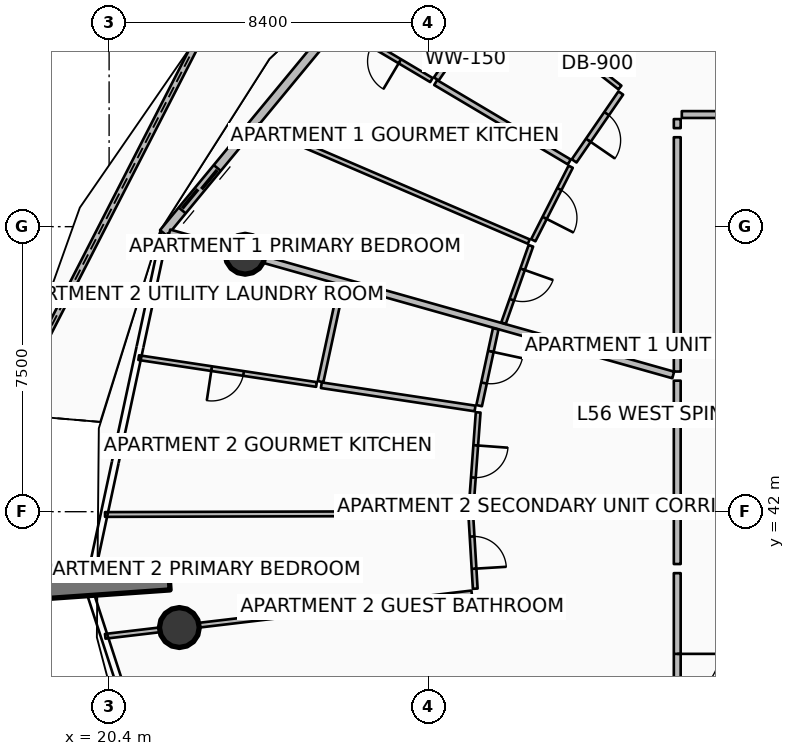
"""IFC4 building model, lengths in metres.
Left out: names, types, materials, properties, quantities, classifications, styles, units other than length and angle.
Written with IfcOpenShell. Run it as: python <this file> out.ifc"""

import sys

from ifc_helpers import new_model, si_unit, direction, frame, frame_2d, origin, origin_2d, place, context, subcontext, project, spatial, polyline, rectangle, circle, outline, extrude, element, fill, save


model = new_model("IFC4")
c1 = context("Model", 3, precision=1e-05, world=origin(), true_north=direction((0.0, 1.0)))
c2 = subcontext(c1, "Body", "Model", "MODEL_VIEW")
j1 = project(units=[si_unit("LENGTHUNIT", "METRE"), si_unit("PLANEANGLEUNIT", "RADIAN")], contexts=[c1])
p1 = place(None, origin())
s1 = spatial("IfcSite", under=j1, at=p1, CompositionType="ELEMENT")
p2 = place(p1, origin())
s2 = spatial("IfcBuilding", under=s1, at=p2, CompositionType="ELEMENT")
p3 = place(p2, frame((0.0, 0.0, 221.55)))
s3 = spatial("IfcBuildingStorey", under=s2, at=p3, CompositionType="ELEMENT", Elevation=221.55)
p4 = place(p3, frame((21.987, 40.181, 0.0), z_axis=(0.0, 0.0, 1.0), x_axis=(-0.997568676264, -0.069690287244, 0.0)))
e1 = element("IfcWall", 1, at=p4, inside=s3, PredefinedType="SOLIDWALL", context=c2, shape_type="SweptSolid", body=[
    extrude(rectangle(XDim=3.5, YDim=0.48, at=frame_2d((1.75, 0.0))), origin(), (0.0, 0.0, 1.0), 3.75),
])
p5 = place(p3, frame((23.98, 48.774, 0.0), z_axis=(-0.277251706749, 0.078156009679, 0.957613246178), x_axis=(-0.271321276561, -0.962488838837, 0.0)))
e2 = element("IfcColumn", 2, at=p5, inside=s3, PredefinedType="COLUMN", context=c2, shape_type="SweptSolid", body=[
    extrude(circle(Radius=0.525, at=origin_2d()), origin(), (0.0, 0.0, 1.0), 3.624),
])
p6 = place(p3, frame((22.248, 38.952, 0.0), z_axis=(-0.296221268103, -0.035054976638, 0.954475829414), x_axis=(0.117520467118, -0.993070460646, 0.0)))
e3 = element("IfcColumn", 3, at=p6, inside=s3, PredefinedType="COLUMN", context=c2, shape_type="SweptSolid", body=[
    extrude(circle(Radius=0.525, at=origin_2d()), origin(), (0.0, 0.0, 1.0), 3.635),
])
p7 = place(p3, frame((22.871, 54.669, 0.0), z_axis=(0.0, 0.0, 1.0), x_axis=(-0.456201330326, -0.889876590437, 0.0)))
e4 = element("IfcWall", 4, at=p7, inside=s3, PredefinedType="PARAPET", context=c2, shape_type="SweptSolid", body=[
    extrude(outline(polyline([(0.0, 0.0), (11.347, 0.0), (11.347, 1.747), (5.674, 1.562), (0.0, 1.348), (0.0, 0.0)])), frame((0.0, 0.09, 0.0), z_axis=(0.0, -1.0, 0.0), x_axis=(1.0, 0.0, 0.0)), (0.0, 0.0, 1.0), 0.18),
])
p8 = place(p3, frame((28.515, 57.424, 0.0), z_axis=(0.0, 0.0, 1.0), x_axis=(-0.636759394418, -0.771062561418, 0.0)))
e5 = element("IfcWall", 5, at=p8, inside=s3, PredefinedType="SOLIDWALL", context=c2, shape_type="SweptSolid", body=[
    extrude(rectangle(XDim=10.494, YDim=0.24, at=frame_2d((5.247, 0.0))), origin(), (0.0, 0.0, 1.0), 2.42),
])
p9 = place(p8, frame((8.274, 0.0, 0.0)))
e6 = element("IfcOpeningElement", 6, at=p9, cuts=e5, PredefinedType="OPENING", context=c2, shape_type="SweptSolid", body=[
    extrude(rectangle(XDim=1.45, YDim=2.15, at=frame_2d((0.725, 1.075))), frame((0.0, 0.13, 0.0), z_axis=(0.0, -1.0, 0.0), x_axis=(1.0, 0.0, 0.0)), (0.0, 0.0, 1.0), 0.26),
])
p10 = place(p8, frame((0.28, 0.0, 0.65)))
e7 = element("IfcOpeningElement", 7, at=p10, cuts=e5, PredefinedType="OPENING", context=c2, shape_type="SweptSolid", body=[
    extrude(rectangle(XDim=1.6, YDim=1.5, at=frame_2d((0.8, 0.75))), frame((0.0, 0.13, 0.0), z_axis=(0.0, -1.0, 0.0), x_axis=(1.0, 0.0, 0.0)), (0.0, 0.0, 1.0), 0.26),
])
p11 = place(p3, frame((35.244, 45.598, 0.0), z_axis=(0.0, 0.0, 1.0), x_axis=(-0.962456561262, 0.271435752405, 0.0)))
e8 = element("IfcWall", 8, at=p11, inside=s3, PredefinedType="PARTITIONING", context=c2, shape_type="SweptSolid", body=[
    extrude(rectangle(XDim=13.777, YDim=0.18, at=frame_2d((6.888, 0.0))), origin(), (0.0, 0.0, 1.0), 2.427),
])
p12 = place(p3, frame((42.028, 52.45, 0.0), z_axis=(0.0, 0.0, 1.0), x_axis=(-1.0, 0.0, 0.0)))
e9 = element("IfcWall", 9, at=p12, inside=s3, PredefinedType="PARTITIONING", context=c2, shape_type="SweptSolid", body=[
    extrude(rectangle(XDim=6.558, YDim=0.18, at=frame_2d((3.279, 0.0))), origin(), (0.0, 0.0, 1.0), 2.427),
])
p13 = place(p12, frame((2.729, 0.0, 0.0)))
e10 = element("IfcOpeningElement", 10, at=p13, cuts=e9, PredefinedType="OPENING", context=c2, shape_type="SweptSolid", body=[
    extrude(rectangle(XDim=1.1, YDim=2.1, at=frame_2d((0.55, 1.05))), frame((0.0, 0.1, 0.0), z_axis=(0.0, -1.0, 0.0), x_axis=(1.0, 0.0, 0.0)), (0.0, 0.0, 1.0), 0.2),
])
p14 = place(p3, frame((35.35, 52.33, 0.0), z_axis=(0.0, 0.0, 1.0), x_axis=(0.0, -1.0, 0.0)))
e11 = element("IfcWall", 11, at=p14, inside=s3, PredefinedType="PARTITIONING", context=c2, shape_type="SweptSolid", body=[
    extrude(rectangle(XDim=0.238, YDim=0.18, at=frame_2d((0.119, 0.0))), origin(), (0.0, 0.0, 1.0), 2.427),
])
p15 = place(p3, frame((35.35, 51.853, 0.0), z_axis=(0.0, 0.0, 1.0), x_axis=(0.0, -1.0, 0.0)))
e12 = element("IfcWall", 12, at=p15, inside=s3, PredefinedType="PARTITIONING", context=c2, shape_type="SweptSolid", body=[
    extrude(rectangle(XDim=6.165, YDim=0.18, at=frame_2d((3.083, 0.0))), origin(), (0.0, 0.0, 1.0), 2.427),
])
p16 = place(p3, frame((33.842, 53.161, 0.0), z_axis=(0.0, 0.0, 1.0), x_axis=(-0.785311801239, 0.619100456173, 0.0)))
e13 = element("IfcWall", 13, at=p16, inside=s3, PredefinedType="PARTITIONING", context=c2, shape_type="SweptSolid", body=[
    extrude(rectangle(XDim=6.799, YDim=0.125, at=frame_2d((3.4, 0.0))), origin(), (0.0, 0.0, 1.0), 2.427),
])
p17 = place(p3, frame((33.864, 53.017, 0.0), z_axis=(0.0, 0.0, 1.0), x_axis=(-0.56614137875, -0.824308157953, 0.0)))
e14 = element("IfcWall", 14, at=p17, inside=s3, PredefinedType="PARTITIONING", context=c2, shape_type="SweptSolid", body=[
    extrude(rectangle(XDim=2.167, YDim=0.15, at=frame_2d((1.083, 0.0))), origin(), (0.0, 0.0, 1.0), 2.427),
])
p18 = place(p17, frame((0.658, 0.0, 0.0)))
e15 = element("IfcOpeningElement", 15, at=p18, cuts=e14, PredefinedType="OPENING", context=c2, shape_type="SweptSolid", body=[
    extrude(rectangle(XDim=0.85, YDim=2.06, at=frame_2d((0.425, 1.03))), frame((0.0, 0.085, 0.0), z_axis=(0.0, -1.0, 0.0), x_axis=(1.0, 0.0, 0.0)), (0.0, 0.0, 1.0), 0.17),
])
p19 = place(p3, frame((30.55, 55.629, 0.0), z_axis=(0.0, 0.0, 1.0), x_axis=(-0.566136620745, -0.824311425768, 0.0)))
e16 = element("IfcWall", 16, at=p19, inside=s3, PredefinedType="PARTITIONING", context=c2, shape_type="SweptSolid", body=[
    extrude(rectangle(XDim=2.721, YDim=0.15, at=frame_2d((1.361, 0.0))), origin(), (0.0, 0.0, 1.0), 2.427),
])
p20 = place(p3, frame((32.509, 51.202, 0.0), z_axis=(0.0, 0.0, 1.0), x_axis=(-0.859744174922, 0.510724929573, 0.0)))
e17 = element("IfcWall", 17, at=p20, inside=s3, PredefinedType="PARTITIONING", context=c2, shape_type="SweptSolid", body=[
    extrude(rectangle(XDim=4.09, YDim=0.15, at=frame_2d((2.045, 0.0))), origin(), (0.0, 0.0, 1.0), 2.91),
])
p21 = place(p3, frame((28.881, 53.358, 0.0), z_axis=(0.0, 0.0, 1.0), x_axis=(-0.859746342612, 0.51072128051, 0.0)))
e18 = element("IfcWall", 18, at=p21, inside=s3, PredefinedType="PARTITIONING", context=c2, shape_type="SweptSolid", body=[
    extrude(rectangle(XDim=2.781, YDim=0.125, at=frame_2d((1.391, 0.0))), origin(), (0.0, 0.0, 1.0), 2.445),
])
p22 = place(p21, frame((0.966, 0.0, 0.0)))
e19 = element("IfcOpeningElement", 19, at=p22, cuts=e18, PredefinedType="OPENING", context=c2, shape_type="SweptSolid", body=[
    extrude(rectangle(XDim=0.85, YDim=2.06, at=frame_2d((0.425, 1.03))), frame((0.0, 0.073, 0.0), z_axis=(0.0, -1.0, 0.0), x_axis=(1.0, 0.0, 0.0)), (0.0, 0.0, 1.0), 0.145),
])
p23 = place(p3, frame((31.443, 49.107, 0.0), z_axis=(0.0, 0.0, 1.0), x_axis=(-0.918923160155, 0.394436592789, 0.0)))
e20 = element("IfcWall", 20, at=p23, inside=s3, PredefinedType="PARTITIONING", context=c2, shape_type="SweptSolid", body=[
    extrude(rectangle(XDim=7.746, YDim=0.125, at=frame_2d((3.873, 0.0))), origin(), (0.0, 0.0, 1.0), 2.445),
])
p24 = place(p3, frame((32.546, 51.076, 0.0), z_axis=(0.0, 0.0, 1.0), x_axis=(-0.453549779993, -0.891230944855, 0.0)))
e21 = element("IfcWall", 21, at=p24, inside=s3, PredefinedType="PARTITIONING", context=c2, shape_type="SweptSolid", body=[
    extrude(rectangle(XDim=2.169, YDim=0.125, at=frame_2d((1.084, 0.0))), origin(), (0.0, 0.0, 1.0), 2.91),
])
p25 = place(p24, frame((0.66, 0.0, 0.0)))
e22 = element("IfcOpeningElement", 22, at=p25, cuts=e21, PredefinedType="OPENING", context=c2, shape_type="SweptSolid", body=[
    extrude(rectangle(XDim=0.85, YDim=2.06, at=frame_2d((0.425, 1.03))), frame((0.0, 0.073, 0.0), z_axis=(0.0, -1.0, 0.0), x_axis=(1.0, 0.0, 0.0)), (0.0, 0.0, 1.0), 0.145),
])
p26 = place(p3, frame((31.499, 48.996, 0.0), z_axis=(0.0, 0.0, 1.0), x_axis=(-0.333577104371, -0.942722820048, 0.0)))
e23 = element("IfcWall", 23, at=p26, inside=s3, PredefinedType="PARTITIONING", context=c2, shape_type="SweptSolid", body=[
    extrude(rectangle(XDim=2.159, YDim=0.125, at=frame_2d((1.08, 0.0))), origin(), (0.0, 0.0, 1.0), 2.427),
])
p27 = place(p26, frame((0.655, 0.0, 0.0)))
e24 = element("IfcOpeningElement", 24, at=p27, cuts=e23, PredefinedType="OPENING", context=c2, shape_type="SweptSolid", body=[
    extrude(rectangle(XDim=0.85, YDim=2.06, at=frame_2d((0.425, 1.03))), frame((0.0, 0.073, 0.0), z_axis=(0.0, -1.0, 0.0), x_axis=(1.0, 0.0, 0.0)), (0.0, 0.0, 1.0), 0.145),
])
p28 = place(p3, frame((35.35, 40.383, 0.0), z_axis=(0.0, 0.0, 1.0), x_axis=(0.0, -1.0, 0.0)))
e25 = element("IfcWall", 25, at=p28, inside=s3, PredefinedType="PARTITIONING", context=c2, shape_type="SweptSolid", body=[
    extrude(rectangle(XDim=5.347, YDim=0.18, at=frame_2d((2.674, 0.0))), origin(), (0.0, 0.0, 1.0), 2.427),
])
p29 = place(p28, frame((2.124, 0.0, 0.0)))
e26 = element("IfcOpeningElement", 26, at=p29, cuts=e25, PredefinedType="OPENING", context=c2, shape_type="SweptSolid", body=[
    extrude(rectangle(XDim=1.1, YDim=2.1, at=frame_2d((0.55, 1.05))), frame((0.0, 0.1, 0.0), z_axis=(0.0, -1.0, 0.0), x_axis=(1.0, 0.0, 0.0)), (0.0, 0.0, 1.0), 0.2),
])
p30 = place(p3, frame((35.35, 45.448, 0.0), z_axis=(0.0, 0.0, 1.0), x_axis=(0.0, -1.0, 0.0)))
e27 = element("IfcWall", 27, at=p30, inside=s3, PredefinedType="PARTITIONING", context=c2, shape_type="SweptSolid", body=[
    extrude(rectangle(XDim=4.825, YDim=0.18, at=frame_2d((2.413, 0.0))), origin(), (0.0, 0.0, 1.0), 2.427),
])
p31 = place(p3, frame((29.941, 39.863, 0.0), z_axis=(0.0, 0.0, 1.0), x_axis=(-0.993068152832, -0.117539966947, 0.0)))
e28 = element("IfcWall", 28, at=p31, inside=s3, PredefinedType="PARTITIONING", context=c2, shape_type="SweptSolid", body=[
    extrude(rectangle(XDim=9.71, YDim=0.125, at=frame_2d((4.855, 0.0))), origin(), (0.0, 0.0, 1.0), 2.427),
])
p32 = place(p3, frame((30.573, 46.811, 0.0), z_axis=(0.0, 0.0, 1.0), x_axis=(-0.210835659219, -0.977521521401, 0.0)))
e29 = element("IfcWall", 29, at=p32, inside=s3, PredefinedType="PARTITIONING", context=c2, shape_type="SweptSolid", body=[
    extrude(rectangle(XDim=2.067, YDim=0.15, at=frame_2d((1.033, 0.0))), origin(), (0.0, 0.0, 1.0), 2.427),
])
p33 = place(p32, frame((0.608, 0.0, 0.0)))
e30 = element("IfcOpeningElement", 30, at=p33, cuts=e29, PredefinedType="OPENING", context=c2, shape_type="SweptSolid", body=[
    extrude(rectangle(XDim=0.85, YDim=2.06, at=frame_2d((0.425, 1.03))), frame((0.0, 0.085, 0.0), z_axis=(0.0, -1.0, 0.0), x_axis=(1.0, 0.0, 0.0)), (0.0, 0.0, 1.0), 0.17),
])
p34 = place(p3, frame((26.511, 47.957, 0.0), z_axis=(0.0, 0.0, 1.0), x_axis=(-0.21075674418, -0.977538538771, 0.0)))
e31 = element("IfcWall", 31, at=p34, inside=s3, PredefinedType="PARTITIONING", context=c2, shape_type="SweptSolid", body=[
    extrude(rectangle(XDim=2.594, YDim=0.15, at=frame_2d((1.297, 0.0))), origin(), (0.0, 0.0, 1.0), 2.427),
])
p35 = place(p3, frame((30.029, 44.716, 0.0), z_axis=(0.0, 0.0, 1.0), x_axis=(-0.988774638917, 0.149414569018, 0.0)))
e32 = element("IfcWall", 32, at=p35, inside=s3, PredefinedType="PARTITIONING", context=c2, shape_type="SweptSolid", body=[
    extrude(rectangle(XDim=4.09, YDim=0.15, at=frame_2d((2.045, 0.0))), origin(), (0.0, 0.0, 1.0), 2.91),
])
p36 = place(p3, frame((25.856, 45.347, 0.0), z_axis=(0.0, 0.0, 1.0), x_axis=(-0.988769177465, 0.149450706573, 0.0)))
e33 = element("IfcWall", 33, at=p36, inside=s3, PredefinedType="PARTITIONING", context=c2, shape_type="SweptSolid", body=[
    extrude(rectangle(XDim=4.731, YDim=0.125, at=frame_2d((2.365, 0.0))), origin(), (0.0, 0.0, 1.0), 2.445),
])
p37 = place(p36, frame((1.94, 0.0, 0.0)))
e34 = element("IfcOpeningElement", 34, at=p37, cuts=e33, PredefinedType="OPENING", context=c2, shape_type="SweptSolid", body=[
    extrude(rectangle(XDim=0.85, YDim=2.06, at=frame_2d((0.425, 1.03))), frame((0.0, 0.073, 0.0), z_axis=(0.0, -1.0, 0.0), x_axis=(1.0, 0.0, 0.0)), (0.0, 0.0, 1.0), 0.145),
])
p38 = place(p3, frame((29.825, 41.952, 0.0), z_axis=(0.0, 0.0, 1.0), x_axis=(-0.999996520366, -0.002638040201, 0.0)))
e35 = element("IfcWall", 35, at=p38, inside=s3, PredefinedType="PARTITIONING", context=c2, shape_type="SweptSolid", body=[
    extrude(rectangle(XDim=9.532, YDim=0.125, at=frame_2d((4.766, 0.0))), origin(), (0.0, 0.0, 1.0), 2.445),
])
p39 = place(p3, frame((30.112, 44.613, 0.0), z_axis=(0.0, 0.0, 1.0), x_axis=(-0.073673624572, -0.997282405862, 0.0)))
e36 = element("IfcWall", 36, at=p39, inside=s3, PredefinedType="PARTITIONING", context=c2, shape_type="SweptSolid", body=[
    extrude(rectangle(XDim=2.588, YDim=0.125, at=frame_2d((1.294, 0.0))), origin(), (0.0, 0.0, 1.0), 2.91),
])
p40 = place(p39, frame((0.869, 0.0, 0.0)))
e37 = element("IfcOpeningElement", 37, at=p40, cuts=e36, PredefinedType="OPENING", context=c2, shape_type="SweptSolid", body=[
    extrude(rectangle(XDim=0.85, YDim=2.06, at=frame_2d((0.425, 1.03))), frame((0.0, 0.073, 0.0), z_axis=(0.0, -1.0, 0.0), x_axis=(1.0, 0.0, 0.0)), (0.0, 0.0, 1.0), 0.145),
])
p41 = place(p3, frame((29.92, 41.872, 0.0), z_axis=(0.0, 0.0, 1.0), x_axis=(0.060212096345, -0.998185605714, 0.0)))
e38 = element("IfcWall", 38, at=p41, inside=s3, PredefinedType="PARTITIONING", context=c2, shape_type="SweptSolid", body=[
    extrude(rectangle(XDim=1.902, YDim=0.125, at=frame_2d((0.951, 0.0))), origin(), (0.0, 0.0, 1.0), 2.427),
])
p42 = place(p41, frame((0.526, 0.0, 0.0)))
e39 = element("IfcOpeningElement", 39, at=p42, cuts=e38, PredefinedType="OPENING", context=c2, shape_type="SweptSolid", body=[
    extrude(rectangle(XDim=0.85, YDim=2.06, at=frame_2d((0.425, 1.03))), frame((0.0, 0.073, 0.0), z_axis=(0.0, -1.0, 0.0), x_axis=(1.0, 0.0, 0.0)), (0.0, 0.0, 1.0), 0.145),
])
p43 = place(p9, origin())
e40 = element("IfcDoor", 40, at=p43, inside=s3, OperationType="DOUBLE_DOOR_SLIDING", PredefinedType="DOOR", context=c2, shape_type="SweptSolid", body=[
    extrude(rectangle(XDim=1.45, YDim=2.15, at=frame_2d((0.725, 1.075))), frame((0.0, 0.025, 0.0), z_axis=(0.0, -1.0, 0.0), x_axis=(1.0, 0.0, 0.0)), (0.0, 0.0, 1.0), 0.05),
])
fill(e6, e40)
p44 = place(p18, origin())
e41 = element("IfcDoor", 41, at=p44, inside=s3, OperationType="SINGLE_SWING_RIGHT", PredefinedType="DOOR", context=c2, shape_type="SweptSolid", body=[
    extrude(rectangle(XDim=0.85, YDim=2.06, at=frame_2d((0.425, 1.03))), frame((0.0, 0.025, 0.0), z_axis=(0.0, -1.0, 0.0), x_axis=(1.0, 0.0, 0.0)), (0.0, 0.0, 1.0), 0.05),
])
fill(e15, e41)
p45 = place(p22, origin())
e42 = element("IfcDoor", 42, at=p45, inside=s3, OperationType="SINGLE_SWING_LEFT", PredefinedType="DOOR", context=c2, shape_type="SweptSolid", body=[
    extrude(rectangle(XDim=0.85, YDim=2.06, at=frame_2d((0.425, 1.03))), frame((0.0, 0.025, 0.0), z_axis=(0.0, -1.0, 0.0), x_axis=(1.0, 0.0, 0.0)), (0.0, 0.0, 1.0), 0.05),
])
fill(e19, e42)
p46 = place(p25, origin())
e43 = element("IfcDoor", 43, at=p46, inside=s3, OperationType="SINGLE_SWING_RIGHT", PredefinedType="DOOR", context=c2, shape_type="SweptSolid", body=[
    extrude(rectangle(XDim=0.85, YDim=2.06, at=frame_2d((0.425, 1.03))), frame((0.0, 0.025, 0.0), z_axis=(0.0, -1.0, 0.0), x_axis=(1.0, 0.0, 0.0)), (0.0, 0.0, 1.0), 0.05),
])
fill(e22, e43)
p47 = place(p27, origin())
e44 = element("IfcDoor", 44, at=p47, inside=s3, OperationType="SINGLE_SWING_LEFT", PredefinedType="DOOR", context=c2, shape_type="SweptSolid", body=[
    extrude(rectangle(XDim=0.85, YDim=2.06, at=frame_2d((0.425, 1.03))), frame((0.0, 0.025, 0.0), z_axis=(0.0, -1.0, 0.0), x_axis=(1.0, 0.0, 0.0)), (0.0, 0.0, 1.0), 0.05),
])
fill(e24, e44)
p48 = place(p29, origin())
e45 = element("IfcDoor", 45, at=p48, inside=s3, OperationType="SINGLE_SWING_LEFT", PredefinedType="DOOR", context=c2, shape_type="SweptSolid", body=[
    extrude(rectangle(XDim=1.1, YDim=2.1, at=frame_2d((0.55, 1.05))), frame((0.0, 0.025, 0.0), z_axis=(0.0, -1.0, 0.0), x_axis=(1.0, 0.0, 0.0)), (0.0, 0.0, 1.0), 0.05),
])
fill(e26, e45)
p49 = place(p33, origin())
e46 = element("IfcDoor", 46, at=p49, inside=s3, OperationType="SINGLE_SWING_LEFT", PredefinedType="DOOR", context=c2, shape_type="SweptSolid", body=[
    extrude(rectangle(XDim=0.85, YDim=2.06, at=frame_2d((0.425, 1.03))), frame((0.0, 0.025, 0.0), z_axis=(0.0, -1.0, 0.0), x_axis=(1.0, 0.0, 0.0)), (0.0, 0.0, 1.0), 0.05),
])
fill(e30, e46)
p50 = place(p37, origin())
e47 = element("IfcDoor", 47, at=p50, inside=s3, OperationType="SINGLE_SWING_RIGHT", PredefinedType="DOOR", context=c2, shape_type="SweptSolid", body=[
    extrude(rectangle(XDim=0.85, YDim=2.06, at=frame_2d((0.425, 1.03))), frame((0.0, 0.025, 0.0), z_axis=(0.0, -1.0, 0.0), x_axis=(1.0, 0.0, 0.0)), (0.0, 0.0, 1.0), 0.05),
])
fill(e34, e47)
p51 = place(p40, origin())
e48 = element("IfcDoor", 48, at=p51, inside=s3, OperationType="SINGLE_SWING_LEFT", PredefinedType="DOOR", context=c2, shape_type="SweptSolid", body=[
    extrude(rectangle(XDim=0.85, YDim=2.06, at=frame_2d((0.425, 1.03))), frame((0.0, 0.025, 0.0), z_axis=(0.0, -1.0, 0.0), x_axis=(1.0, 0.0, 0.0)), (0.0, 0.0, 1.0), 0.05),
])
fill(e37, e48)
p52 = place(p42, origin())
e49 = element("IfcDoor", 49, at=p52, inside=s3, OperationType="SINGLE_SWING_RIGHT", PredefinedType="DOOR", context=c2, shape_type="SweptSolid", body=[
    extrude(rectangle(XDim=0.85, YDim=2.06, at=frame_2d((0.425, 1.03))), frame((0.0, 0.025, 0.0), z_axis=(0.0, -1.0, 0.0), x_axis=(1.0, 0.0, 0.0)), (0.0, 0.0, 1.0), 0.05),
])
fill(e39, e49)
save(model, sys.argv[1])
